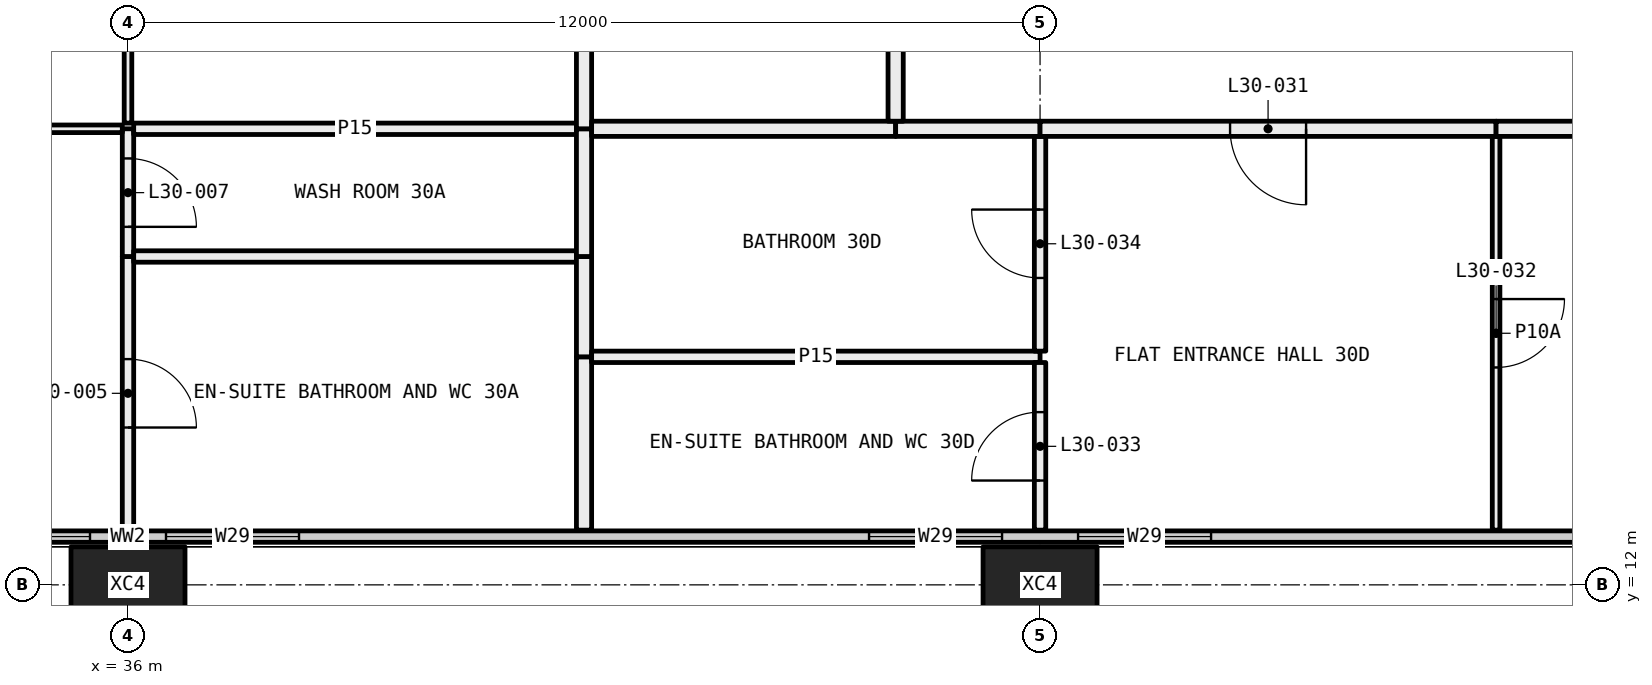
"""IFC4 building model, lengths in metres.
Left out: names, types, materials, properties, quantities, classifications, styles, units other than length and angle.
Written with IfcOpenShell. Run it as: python <this file> out.ifc"""

import sys

from ifc_helpers import new_model, si_unit, direction, frame, frame_2d, origin, origin_2d, place, context, subcontext, project, spatial, rectangle, hollow_rectangle, extrude, element, fill, save


model = new_model("IFC4")
c1 = context("Model", 3, precision=1e-05, world=origin(), true_north=direction((0.0, 1.0)))
c2 = subcontext(c1, "Body", "Model", "MODEL_VIEW")
j1 = project(units=[si_unit("LENGTHUNIT", "METRE"), si_unit("PLANEANGLEUNIT", "RADIAN")], contexts=[c1])
p1 = place(None, origin())
s1 = spatial("IfcSite", under=j1, at=p1, CompositionType="ELEMENT")
p2 = place(p1, origin())
s2 = spatial("IfcBuilding", under=s1, at=p2, CompositionType="ELEMENT")
p3 = place(p2, frame((0.0, 0.0, 117.3)))
s3 = spatial("IfcBuildingStorey", under=s2, at=p3, CompositionType="ELEMENT", Elevation=117.3)
for number, where, z_axis, x_axis in (
    (1, (36.0, 12.0, -0.4), (0.0, 0.0, 1.0), (1.0, 0.0, 0.0)),
    (2, (48.0, 12.0, -0.4), (0.0, 0.0, 1.0), (1.0, 0.0, 0.0)),
):
    element("IfcColumn", number, at=place(p3, frame(where, z_axis=z_axis, x_axis=x_axis)), inside=s3, PredefinedType="COLUMN", context=c2, shape_type="SweptSolid", body=[
        extrude(hollow_rectangle(XDim=1.5, YDim=1.0, WallThickness=0.06, at=origin_2d()), origin(), (0.0, 0.0, 1.0), 3.45),
    ])
p4 = place(p3, frame((6.56, 12.635, 0.0), z_axis=(0.0, 0.0, 1.0), x_axis=(1.0, 0.0, 0.0)))
e3 = element("IfcWall", 3, at=p4, inside=s3, PredefinedType="ELEMENTEDWALL", context=c2, shape_type="SweptSolid", body=[
    extrude(rectangle(XDim=58.88, YDim=0.15, at=frame_2d((29.44, 0.0))), origin(), (0.0, 0.0, 1.0), 3.05),
])
p5 = place(p4, frame((0.44, 0.0, 0.45)))
e4 = element("IfcOpeningElement", 4, at=p5, cuts=e3, PredefinedType="OPENING", context=c2, shape_type="SweptSolid", body=[
    extrude(rectangle(XDim=4.5, YDim=2.55, at=frame_2d((2.25, 1.275))), frame((0.0, 0.085, 0.0), z_axis=(0.0, -1.0, 0.0), x_axis=(1.0, 0.0, 0.0)), (0.0, 0.0, 1.0), 0.17),
])
p6 = place(p4, frame((5.94, 0.0, 0.45)))
e5 = element("IfcOpeningElement", 5, at=p6, cuts=e3, PredefinedType="OPENING", context=c2, shape_type="SweptSolid", body=[
    extrude(rectangle(XDim=1.75, YDim=2.55, at=frame_2d((0.875, 1.275))), frame((0.0, 0.085, 0.0), z_axis=(0.0, -1.0, 0.0), x_axis=(1.0, 0.0, 0.0)), (0.0, 0.0, 1.0), 0.17),
])
p7 = place(p4, frame((15.19, 0.0, 0.45)))
e6 = element("IfcOpeningElement", 6, at=p7, cuts=e3, PredefinedType="OPENING", context=c2, shape_type="SweptSolid", body=[
    extrude(rectangle(XDim=1.75, YDim=2.55, at=frame_2d((0.875, 1.275))), frame((0.0, 0.085, 0.0), z_axis=(0.0, -1.0, 0.0), x_axis=(1.0, 0.0, 0.0)), (0.0, 0.0, 1.0), 0.17),
])
p8 = place(p4, frame((17.94, 0.0, 0.45)))
e7 = element("IfcOpeningElement", 7, at=p8, cuts=e3, PredefinedType="OPENING", context=c2, shape_type="SweptSolid", body=[
    extrude(rectangle(XDim=1.75, YDim=2.55, at=frame_2d((0.875, 1.275))), frame((0.0, 0.085, 0.0), z_axis=(0.0, -1.0, 0.0), x_axis=(1.0, 0.0, 0.0)), (0.0, 0.0, 1.0), 0.17),
])
p9 = place(p4, frame((27.19, 0.0, 0.45)))
e8 = element("IfcOpeningElement", 8, at=p9, cuts=e3, PredefinedType="OPENING", context=c2, shape_type="SweptSolid", body=[
    extrude(rectangle(XDim=1.75, YDim=2.55, at=frame_2d((0.875, 1.275))), frame((0.0, 0.085, 0.0), z_axis=(0.0, -1.0, 0.0), x_axis=(1.0, 0.0, 0.0)), (0.0, 0.0, 1.0), 0.17),
])
p10 = place(p4, frame((29.94, 0.0, 0.45)))
e9 = element("IfcOpeningElement", 9, at=p10, cuts=e3, PredefinedType="OPENING", context=c2, shape_type="SweptSolid", body=[
    extrude(rectangle(XDim=1.75, YDim=2.55, at=frame_2d((0.875, 1.275))), frame((0.0, 0.085, 0.0), z_axis=(0.0, -1.0, 0.0), x_axis=(1.0, 0.0, 0.0)), (0.0, 0.0, 1.0), 0.17),
])
p11 = place(p4, frame((39.19, 0.0, 0.45)))
e10 = element("IfcOpeningElement", 10, at=p11, cuts=e3, PredefinedType="OPENING", context=c2, shape_type="SweptSolid", body=[
    extrude(rectangle(XDim=1.75, YDim=2.55, at=frame_2d((0.875, 1.275))), frame((0.0, 0.085, 0.0), z_axis=(0.0, -1.0, 0.0), x_axis=(1.0, 0.0, 0.0)), (0.0, 0.0, 1.0), 0.17),
])
p12 = place(p4, frame((41.94, 0.0, 0.45)))
e11 = element("IfcOpeningElement", 11, at=p12, cuts=e3, PredefinedType="OPENING", context=c2, shape_type="SweptSolid", body=[
    extrude(rectangle(XDim=1.75, YDim=2.55, at=frame_2d((0.875, 1.275))), frame((0.0, 0.085, 0.0), z_axis=(0.0, -1.0, 0.0), x_axis=(1.0, 0.0, 0.0)), (0.0, 0.0, 1.0), 0.17),
])
p13 = place(p4, frame((51.19, 0.0, 0.45)))
e12 = element("IfcOpeningElement", 12, at=p13, cuts=e3, PredefinedType="OPENING", context=c2, shape_type="SweptSolid", body=[
    extrude(rectangle(XDim=1.75, YDim=2.55, at=frame_2d((0.875, 1.275))), frame((0.0, 0.085, 0.0), z_axis=(0.0, -1.0, 0.0), x_axis=(1.0, 0.0, 0.0)), (0.0, 0.0, 1.0), 0.17),
])
p14 = place(p4, frame((53.94, 0.0, 0.45)))
e13 = element("IfcOpeningElement", 13, at=p14, cuts=e3, PredefinedType="OPENING", context=c2, shape_type="SweptSolid", body=[
    extrude(rectangle(XDim=4.5, YDim=2.55, at=frame_2d((2.25, 1.275))), frame((0.0, 0.085, 0.0), z_axis=(0.0, -1.0, 0.0), x_axis=(1.0, 0.0, 0.0)), (0.0, 0.0, 1.0), 0.17),
])
p15 = place(p3, frame((36.0, 12.72, 0.0), z_axis=(0.0, 0.0, 1.0), x_axis=(0.0, 1.0, 0.0)))
e14 = element("IfcWall", 14, at=p15, inside=s3, PredefinedType="PARTITIONING", context=c2, shape_type="SweptSolid", body=[
    extrude(rectangle(XDim=3.6, YDim=0.15, at=frame_2d((1.8, 0.0))), origin(), (0.0, 0.0, 1.0), 2.45),
])
p16 = place(p15, frame((1.35, 0.0, 0.0)))
e15 = element("IfcOpeningElement", 15, at=p16, cuts=e14, PredefinedType="OPENING", context=c2, shape_type="SweptSolid", body=[
    extrude(rectangle(XDim=0.9, YDim=2.1, at=frame_2d((0.45, 1.05))), frame((0.0, 0.085, 0.0), z_axis=(0.0, -1.0, 0.0), x_axis=(1.0, 0.0, 0.0)), (0.0, 0.0, 1.0), 0.17),
])
p17 = place(p3, frame((36.0, 16.32, 0.0), z_axis=(0.0, 0.0, 1.0), x_axis=(0.0, 1.0, 0.0)))
e16 = element("IfcWall", 16, at=p17, inside=s3, PredefinedType="PARTITIONING", context=c2, shape_type="SweptSolid", body=[
    extrude(rectangle(XDim=1.68, YDim=0.15, at=frame_2d((0.84, 0.0))), origin(), (0.0, 0.0, 1.0), 2.45),
])
p18 = place(p17, frame((0.39, 0.0, 0.0)))
e17 = element("IfcOpeningElement", 17, at=p18, cuts=e16, PredefinedType="OPENING", context=c2, shape_type="SweptSolid", body=[
    extrude(rectangle(XDim=0.9, YDim=2.1, at=frame_2d((0.45, 1.05))), frame((0.0, 0.085, 0.0), z_axis=(0.0, -1.0, 0.0), x_axis=(1.0, 0.0, 0.0)), (0.0, 0.0, 1.0), 0.17),
])
p19 = place(p3, frame((35.925, 18.0, 0.0), z_axis=(0.0, 0.0, 1.0), x_axis=(-1.0, 0.0, 0.0)))
e18 = element("IfcWall", 18, at=p19, inside=s3, PredefinedType="PARTITIONING", context=c2, shape_type="SweptSolid", body=[
    extrude(rectangle(XDim=4.425, YDim=0.1, at=frame_2d((2.212, 0.0))), origin(), (0.0, 0.0, 1.0), 2.45),
])
p20 = place(p19, frame((1.762, 0.0, 0.0)))
e19 = element("IfcOpeningElement", 19, at=p20, cuts=e18, PredefinedType="OPENING", context=c2, shape_type="SweptSolid", body=[
    extrude(rectangle(XDim=0.9, YDim=2.1, at=frame_2d((0.45, 1.05))), frame((0.0, 0.06, 0.0), z_axis=(0.0, -1.0, 0.0), x_axis=(1.0, 0.0, 0.0)), (0.0, 0.0, 1.0), 0.12),
])
p21 = place(p3, frame((41.9, 16.32, 0.0), z_axis=(0.0, 0.0, 1.0), x_axis=(-1.0, 0.0, 0.0)))
e20 = element("IfcWall", 20, at=p21, inside=s3, PredefinedType="PARTITIONING", context=c2, shape_type="SweptSolid", body=[
    extrude(rectangle(XDim=5.825, YDim=0.15, at=frame_2d((2.913, 0.0))), origin(), (0.0, 0.0, 1.0), 2.45),
])
p22 = place(p3, frame((42.0, 12.72, 0.0), z_axis=(0.0, 0.0, 1.0), x_axis=(0.0, 1.0, 0.0)))
e21 = element("IfcWall", 21, at=p22, inside=s3, PredefinedType="PARTITIONING", context=c2, shape_type="SweptSolid", body=[
    extrude(rectangle(XDim=2.28, YDim=0.2, at=frame_2d((1.14, 0.0))), origin(), (0.0, 0.0, 1.0), 3.05),
])
p23 = place(p3, frame((42.0, 15.0, 0.0), z_axis=(0.0, 0.0, 1.0), x_axis=(0.0, 1.0, 0.0)))
e22 = element("IfcWall", 22, at=p23, inside=s3, PredefinedType="PARTITIONING", context=c2, shape_type="SweptSolid", body=[
    extrude(rectangle(XDim=1.32, YDim=0.2, at=frame_2d((0.66, 0.0))), origin(), (0.0, 0.0, 1.0), 3.05),
])
p24 = place(p3, frame((41.9, 18.0, 0.0), z_axis=(0.0, 0.0, 1.0), x_axis=(-1.0, 0.0, 0.0)))
e23 = element("IfcWall", 23, at=p24, inside=s3, PredefinedType="PARTITIONING", context=c2, shape_type="SweptSolid", body=[
    extrude(rectangle(XDim=5.825, YDim=0.15, at=frame_2d((2.913, 0.0))), origin(), (0.0, 0.0, 1.0), 2.45),
])
p25 = place(p3, frame((42.0, 16.32, 0.0), z_axis=(0.0, 0.0, 1.0), x_axis=(0.0, 1.0, 0.0)))
e24 = element("IfcWall", 24, at=p25, inside=s3, PredefinedType="PARTITIONING", context=c2, shape_type="SweptSolid", body=[
    extrude(rectangle(XDim=1.68, YDim=0.2, at=frame_2d((0.84, 0.0))), origin(), (0.0, 0.0, 1.0), 3.05),
])
p26 = place(p3, frame((36.0, 18.075, 0.0), z_axis=(0.0, 0.0, 1.0), x_axis=(0.0, 1.0, 0.0)))
e25 = element("IfcWall", 25, at=p26, inside=s3, PredefinedType="PARTITIONING", context=c2, shape_type="SweptSolid", body=[
    extrude(rectangle(XDim=5.175, YDim=0.1, at=frame_2d((2.587, 0.0))), origin(), (0.0, 0.0, 1.0), 2.45),
])
p27 = place(p26, frame((2.137, 0.0, 0.0)))
e26 = element("IfcOpeningElement", 26, at=p27, cuts=e25, PredefinedType="OPENING", context=c2, shape_type="SweptSolid", body=[
    extrude(rectangle(XDim=0.9, YDim=2.1, at=frame_2d((0.45, 1.05))), frame((0.0, 0.06, 0.0), z_axis=(0.0, -1.0, 0.0), x_axis=(1.0, 0.0, 0.0)), (0.0, 0.0, 1.0), 0.12),
])
p28 = place(p3, frame((42.0, 18.0, 0.0), z_axis=(0.0, 0.0, 1.0), x_axis=(0.0, 1.0, 0.0)))
e27 = element("IfcWall", 27, at=p28, inside=s3, PredefinedType="PARTITIONING", context=c2, shape_type="SweptSolid", body=[
    extrude(rectangle(XDim=6.3, YDim=0.2, at=frame_2d((3.15, 0.0))), origin(), (0.0, 0.0, 1.0), 2.45),
])
p29 = place(p3, frame((48.0, 15.0, 0.0), z_axis=(0.0, 0.0, 1.0), x_axis=(-1.0, 0.0, 0.0)))
e28 = element("IfcWall", 28, at=p29, inside=s3, PredefinedType="PARTITIONING", context=c2, shape_type="SweptSolid", body=[
    extrude(rectangle(XDim=5.9, YDim=0.15, at=frame_2d((2.95, 0.0))), origin(), (0.0, 0.0, 1.0), 3.05),
])
p30 = place(p3, frame((48.0, 12.72, 0.0), z_axis=(0.0, 0.0, 1.0), x_axis=(0.0, 1.0, 0.0)))
e29 = element("IfcWall", 29, at=p30, inside=s3, PredefinedType="PARTITIONING", context=c2, shape_type="SweptSolid", body=[
    extrude(rectangle(XDim=2.205, YDim=0.15, at=frame_2d((1.103, 0.0))), origin(), (0.0, 0.0, 1.0), 3.05),
])
p31 = place(p30, frame((0.653, 0.0, 0.0)))
e30 = element("IfcOpeningElement", 30, at=p31, cuts=e29, PredefinedType="OPENING", context=c2, shape_type="SweptSolid", body=[
    extrude(rectangle(XDim=0.9, YDim=2.1, at=frame_2d((0.45, 1.05))), frame((0.0, 0.085, 0.0), z_axis=(0.0, -1.0, 0.0), x_axis=(1.0, 0.0, 0.0)), (0.0, 0.0, 1.0), 0.17),
])
p32 = place(p3, frame((48.0, 15.075, 0.0), z_axis=(0.0, 0.0, 1.0), x_axis=(0.0, 1.0, 0.0)))
e31 = element("IfcWall", 31, at=p32, inside=s3, PredefinedType="PARTITIONING", context=c2, shape_type="SweptSolid", body=[
    extrude(rectangle(XDim=2.825, YDim=0.15, at=frame_2d((1.413, 0.0))), origin(), (0.0, 0.0, 1.0), 3.05),
])
p33 = place(p32, frame((0.962, 0.0, 0.0)))
e32 = element("IfcOpeningElement", 32, at=p33, cuts=e31, PredefinedType="OPENING", context=c2, shape_type="SweptSolid", body=[
    extrude(rectangle(XDim=0.9, YDim=2.1, at=frame_2d((0.45, 1.05))), frame((0.0, 0.085, 0.0), z_axis=(0.0, -1.0, 0.0), x_axis=(1.0, 0.0, 0.0)), (0.0, 0.0, 1.0), 0.17),
])
p34 = place(p3, frame((46.1, 18.0, 0.0), z_axis=(0.0, 0.0, 1.0), x_axis=(-1.0, 0.0, 0.0)))
e33 = element("IfcWall", 33, at=p34, inside=s3, PredefinedType="PARTITIONING", context=c2, shape_type="SweptSolid", body=[
    extrude(rectangle(XDim=4.0, YDim=0.2, at=frame_2d((2.0, 0.0))), origin(), (0.0, 0.0, 1.0), 3.05),
])
p35 = place(p3, frame((48.0, 18.0, 0.0), z_axis=(0.0, 0.0, 1.0), x_axis=(-1.0, 0.0, 0.0)))
e34 = element("IfcWall", 34, at=p35, inside=s3, PredefinedType="PARTITIONING", context=c2, shape_type="SweptSolid", body=[
    extrude(rectangle(XDim=1.9, YDim=0.2, at=frame_2d((0.95, 0.0))), origin(), (0.0, 0.0, 1.0), 3.05),
])
p36 = place(p3, frame((54.0, 12.72, 0.0), z_axis=(0.0, 0.0, 1.0), x_axis=(0.0, 1.0, 0.0)))
e35 = element("IfcWall", 35, at=p36, inside=s3, PredefinedType="PARTITIONING", context=c2, shape_type="SweptSolid", body=[
    extrude(rectangle(XDim=5.18, YDim=0.1, at=frame_2d((2.59, 0.0))), origin(), (0.0, 0.0, 1.0), 3.05),
])
p37 = place(p36, frame((2.14, 0.0, 0.0)))
e36 = element("IfcOpeningElement", 36, at=p37, cuts=e35, PredefinedType="OPENING", context=c2, shape_type="SweptSolid", body=[
    extrude(rectangle(XDim=0.9, YDim=2.1, at=frame_2d((0.45, 1.05))), frame((0.0, 0.06, 0.0), z_axis=(0.0, -1.0, 0.0), x_axis=(1.0, 0.0, 0.0)), (0.0, 0.0, 1.0), 0.12),
])
p38 = place(p3, frame((54.0, 18.0, 0.0), z_axis=(0.0, 0.0, 1.0), x_axis=(-1.0, 0.0, 0.0)))
e37 = element("IfcWall", 37, at=p38, inside=s3, PredefinedType="PARTITIONING", context=c2, shape_type="SweptSolid", body=[
    extrude(rectangle(XDim=6.0, YDim=0.2, at=frame_2d((3.0, 0.0))), origin(), (0.0, 0.0, 1.0), 3.05),
])
p39 = place(p38, frame((2.5, 0.0, 0.0)))
e38 = element("IfcOpeningElement", 38, at=p39, cuts=e37, PredefinedType="OPENING", context=c2, shape_type="SweptSolid", body=[
    extrude(rectangle(XDim=1.0, YDim=2.1, at=frame_2d((0.5, 1.05))), frame((0.0, 0.11, 0.0), z_axis=(0.0, -1.0, 0.0), x_axis=(1.0, 0.0, 0.0)), (0.0, 0.0, 1.0), 0.22),
])
p40 = place(p3, frame((61.9, 18.0, 0.0), z_axis=(0.0, 0.0, 1.0), x_axis=(-1.0, 0.0, 0.0)))
e39 = element("IfcWall", 39, at=p40, inside=s3, PredefinedType="PARTITIONING", context=c2, shape_type="SweptSolid", body=[
    extrude(rectangle(XDim=7.9, YDim=0.2, at=frame_2d((3.95, 0.0))), origin(), (0.0, 0.0, 1.0), 3.05),
])
p41 = place(p3, frame((46.1, 18.1, 0.0), z_axis=(0.0, 0.0, 1.0), x_axis=(0.0, 1.0, 0.0)))
e40 = element("IfcWall", 40, at=p41, inside=s3, PredefinedType="PARTITIONING", context=c2, shape_type="SweptSolid", body=[
    extrude(rectangle(XDim=6.0, YDim=0.2, at=frame_2d((3.0, 0.0))), origin(), (0.0, 0.0, 1.0), 2.45),
])
p42 = place(p41, frame((2.55, 0.0, 0.0)))
e41 = element("IfcOpeningElement", 41, at=p42, cuts=e40, PredefinedType="OPENING", context=c2, shape_type="SweptSolid", body=[
    extrude(rectangle(XDim=0.9, YDim=2.1, at=frame_2d((0.45, 1.05))), frame((0.0, 0.11, 0.0), z_axis=(0.0, -1.0, 0.0), x_axis=(1.0, 0.0, 0.0)), (0.0, 0.0, 1.0), 0.22),
])
p43 = place(p9, origin())
e42 = element("IfcWindow", 42, at=p43, inside=s3, PartitioningType="SINGLE_PANEL", PredefinedType="WINDOW", context=c2, shape_type="SweptSolid", body=[
    extrude(rectangle(XDim=1.75, YDim=2.55, at=frame_2d((0.875, 1.275))), frame((0.0, 0.03, 0.0), z_axis=(0.0, -1.0, 0.0), x_axis=(1.0, 0.0, 0.0)), (0.0, 0.0, 1.0), 0.06),
])
fill(e8, e42)
p44 = place(p10, origin())
e43 = element("IfcWindow", 43, at=p44, inside=s3, PartitioningType="SINGLE_PANEL", PredefinedType="WINDOW", context=c2, shape_type="SweptSolid", body=[
    extrude(rectangle(XDim=1.75, YDim=2.55, at=frame_2d((0.875, 1.275))), frame((0.0, 0.03, 0.0), z_axis=(0.0, -1.0, 0.0), x_axis=(1.0, 0.0, 0.0)), (0.0, 0.0, 1.0), 0.06),
])
fill(e9, e43)
p45 = place(p11, origin())
e44 = element("IfcWindow", 44, at=p45, inside=s3, PartitioningType="SINGLE_PANEL", PredefinedType="WINDOW", context=c2, shape_type="SweptSolid", body=[
    extrude(rectangle(XDim=1.75, YDim=2.55, at=frame_2d((0.875, 1.275))), frame((0.0, 0.03, 0.0), z_axis=(0.0, -1.0, 0.0), x_axis=(1.0, 0.0, 0.0)), (0.0, 0.0, 1.0), 0.06),
])
fill(e10, e44)
p46 = place(p12, origin())
e45 = element("IfcWindow", 45, at=p46, inside=s3, PartitioningType="SINGLE_PANEL", PredefinedType="WINDOW", context=c2, shape_type="SweptSolid", body=[
    extrude(rectangle(XDim=1.75, YDim=2.55, at=frame_2d((0.875, 1.275))), frame((0.0, 0.03, 0.0), z_axis=(0.0, -1.0, 0.0), x_axis=(1.0, 0.0, 0.0)), (0.0, 0.0, 1.0), 0.06),
])
fill(e11, e45)
p47 = place(p16, frame((0.9, 0.0, 0.0), x_axis=(-1.0, 0.0, 0.0)))
e46 = element("IfcDoor", 46, at=p47, inside=s3, OperationType="SINGLE_SWING_LEFT", PredefinedType="DOOR", context=c2, shape_type="SweptSolid", body=[
    extrude(rectangle(XDim=0.9, YDim=2.1, at=frame_2d((0.45, 1.05))), frame((0.0, 0.025, 0.0), z_axis=(0.0, -1.0, 0.0), x_axis=(1.0, 0.0, 0.0)), (0.0, 0.0, 1.0), 0.05),
])
fill(e15, e46)
p48 = place(p18, frame((0.9, 0.0, 0.0), x_axis=(-1.0, 0.0, 0.0)))
e47 = element("IfcDoor", 47, at=p48, inside=s3, OperationType="SINGLE_SWING_LEFT", PredefinedType="DOOR", context=c2, shape_type="SweptSolid", body=[
    extrude(rectangle(XDim=0.9, YDim=2.1, at=frame_2d((0.45, 1.05))), frame((0.0, 0.025, 0.0), z_axis=(0.0, -1.0, 0.0), x_axis=(1.0, 0.0, 0.0)), (0.0, 0.0, 1.0), 0.05),
])
fill(e17, e47)
p49 = place(p39, origin())
e48 = element("IfcDoor", 48, at=p49, inside=s3, OperationType="SINGLE_SWING_RIGHT", PredefinedType="DOOR", context=c2, shape_type="SweptSolid", body=[
    extrude(rectangle(XDim=1.0, YDim=2.1, at=frame_2d((0.5, 1.05))), frame((0.0, 0.025, 0.0), z_axis=(0.0, -1.0, 0.0), x_axis=(1.0, 0.0, 0.0)), (0.0, 0.0, 1.0), 0.05),
])
fill(e38, e48)
p50 = place(p37, frame((0.9, 0.0, 0.0), x_axis=(-1.0, 0.0, 0.0)))
e49 = element("IfcDoor", 49, at=p50, inside=s3, OperationType="SINGLE_SWING_RIGHT", PredefinedType="DOOR", context=c2, shape_type="SweptSolid", body=[
    extrude(rectangle(XDim=0.9, YDim=2.1, at=frame_2d((0.45, 1.05))), frame((0.0, 0.025, 0.0), z_axis=(0.0, -1.0, 0.0), x_axis=(1.0, 0.0, 0.0)), (0.0, 0.0, 1.0), 0.05),
])
fill(e36, e49)
p51 = place(p31, origin())
e50 = element("IfcDoor", 50, at=p51, inside=s3, OperationType="SINGLE_SWING_RIGHT", PredefinedType="DOOR", context=c2, shape_type="SweptSolid", body=[
    extrude(rectangle(XDim=0.9, YDim=2.1, at=frame_2d((0.45, 1.05))), frame((0.0, 0.025, 0.0), z_axis=(0.0, -1.0, 0.0), x_axis=(1.0, 0.0, 0.0)), (0.0, 0.0, 1.0), 0.05),
])
fill(e30, e50)
p52 = place(p33, origin())
e51 = element("IfcDoor", 51, at=p52, inside=s3, OperationType="SINGLE_SWING_LEFT", PredefinedType="DOOR", context=c2, shape_type="SweptSolid", body=[
    extrude(rectangle(XDim=0.9, YDim=2.1, at=frame_2d((0.45, 1.05))), frame((0.0, 0.025, 0.0), z_axis=(0.0, -1.0, 0.0), x_axis=(1.0, 0.0, 0.0)), (0.0, 0.0, 1.0), 0.05),
])
fill(e32, e51)
save(model, sys.argv[1])
